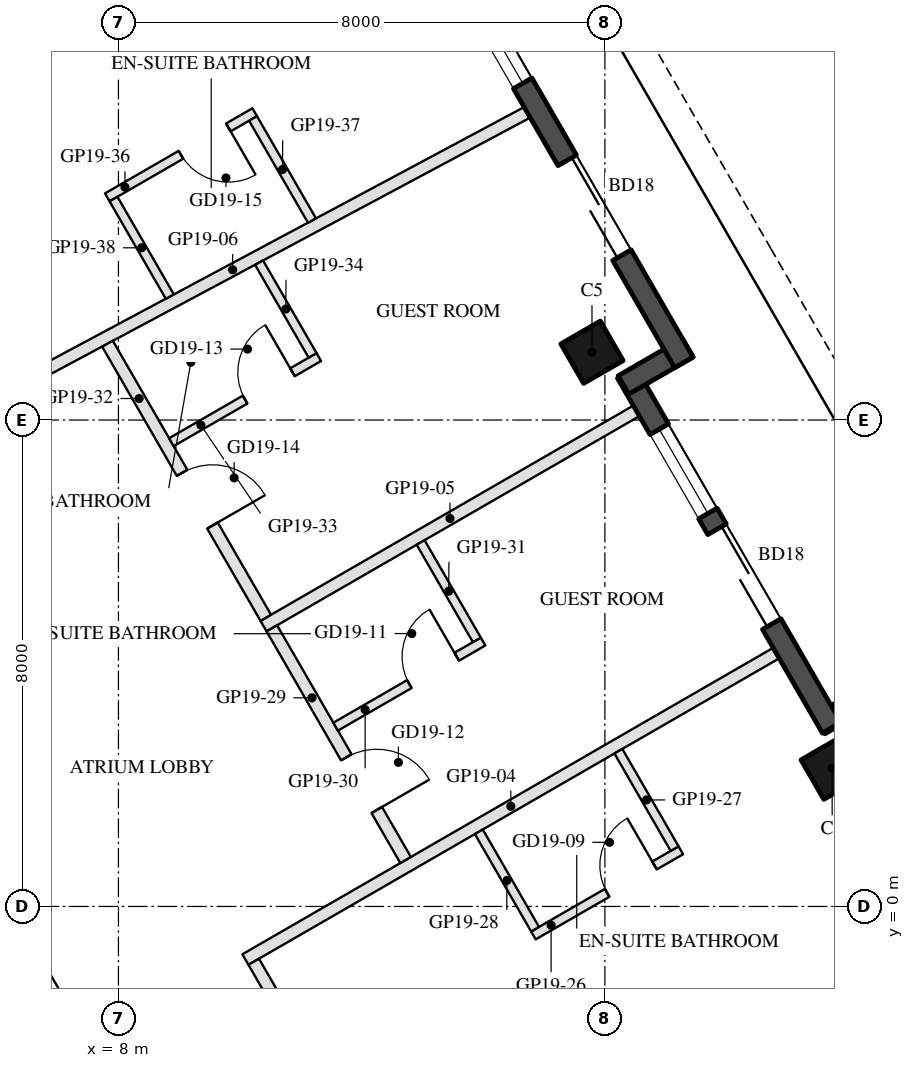
"""IFC4 building model, lengths in metres.
Left out: names, types, materials, properties, quantities, classifications, styles, units other than length and angle.
Written with IfcOpenShell. Run it as: python <this file> out.ifc"""

import sys

from ifc_helpers import new_model, si_unit, direction, frame, frame_2d, origin, origin_2d, place, context, subcontext, project, spatial, rectangle, hollow_rectangle, extrude, element, fill, save


model = new_model("IFC4")
c1 = context("Model", 3, precision=1e-05, world=origin(), true_north=direction((0.0, 1.0)))
c2 = subcontext(c1, "Body", "Model", "MODEL_VIEW")
j1 = project(units=[si_unit("LENGTHUNIT", "METRE"), si_unit("PLANEANGLEUNIT", "RADIAN")], contexts=[c1])
p1 = place(None, origin())
s1 = spatial("IfcSite", under=j1, at=p1, CompositionType="ELEMENT")
p2 = place(p1, origin())
s2 = spatial("IfcBuilding", under=s1, at=p2, CompositionType="ELEMENT")
p3 = place(p2, frame((0.0, 0.0, 205.8)))
s3 = spatial("IfcBuildingStorey", under=s2, at=p3, CompositionType="ELEMENT", Elevation=205.8)
for number, where, z_axis, x_axis in (
    (1, (19.738, 2.273, 0.0), (0.0, 0.0, 1.0), (-0.5, 0.866, 0.0)),
    (2, (15.788, 9.115, 0.0), (0.0, 0.0, 1.0), (-0.5, 0.866, 0.0)),
):
    element("IfcColumn", number, at=place(p3, frame(where, z_axis=z_axis, x_axis=x_axis)), inside=s3, PredefinedType="COLUMN", context=c2, shape_type="SweptSolid", body=[
        extrude(hollow_rectangle(XDim=0.75, YDim=0.75, WallThickness=0.035, at=origin_2d()), origin(), (0.0, 0.0, 1.0), 3.7),
    ])
p4 = place(p3, frame((20.588, 3.601, 0.0), z_axis=(0.0, 0.0, 1.0), x_axis=(-0.866005645448, -0.500034220881, 0.0)))
e3 = element("IfcWall", 3, at=p4, inside=s3, PredefinedType="SOLIDWALL", context=c2, shape_type="SweptSolid", body=[
    extrude(rectangle(XDim=1.22, YDim=0.35, at=frame_2d((0.61, 0.0))), origin(), (0.0, 0.0, 1.0), 3.55),
])
p5 = place(p3, frame((19.729, 2.938, 0.0), z_axis=(0.0, 0.0, 1.0), x_axis=(-0.499976430342, 0.866039011305, 0.0)))
e4 = element("IfcWall", 4, at=p5, inside=s3, PredefinedType="SOLIDWALL", context=c2, shape_type="SweptSolid", body=[
    extrude(rectangle(XDim=6.74, YDim=0.35, at=frame_2d((3.37, 0.0))), origin(), (0.0, 0.0, 1.0), 3.55),
])
p6 = place(p5, frame((1.97, 0.0, 0.0)))
e5 = element("IfcOpeningElement", 5, at=p6, cuts=e4, PredefinedType="OPENING", context=c2, shape_type="SweptSolid", body=[
    extrude(rectangle(XDim=1.8, YDim=2.4, at=frame_2d((0.9, 1.2))), frame((0.0, 0.185, 0.0), z_axis=(0.0, -1.0, 0.0), x_axis=(1.0, 0.0, 0.0)), (0.0, 0.0, 1.0), 0.37),
])
p7 = place(p5, frame((4.07, 0.0, 0.3)))
e6 = element("IfcOpeningElement", 6, at=p7, cuts=e4, PredefinedType="OPENING", context=c2, shape_type="SweptSolid", body=[
    extrude(rectangle(XDim=1.6, YDim=2.65, at=frame_2d((0.8, 1.325))), frame((0.0, 0.185, 0.0), z_axis=(0.0, -1.0, 0.0), x_axis=(1.0, 0.0, 0.0)), (0.0, 0.0, 1.0), 0.37),
])
p8 = place(p3, frame((16.306, 8.577, 0.0), z_axis=(0.0, 0.0, 1.0), x_axis=(0.866092288191, 0.499884134912, 0.0)))
e7 = element("IfcWall", 7, at=p8, inside=s3, PredefinedType="SOLIDWALL", context=c2, shape_type="SweptSolid", body=[
    extrude(rectangle(XDim=1.22, YDim=0.35, at=frame_2d((0.61, 0.0))), origin(), (0.0, 0.0, 1.0), 3.55),
])
p9 = place(p3, frame((17.299, 8.948, 0.0), z_axis=(0.0, 0.0, 1.0), x_axis=(-0.500010041276, 0.866019606374, 0.0)))
e8 = element("IfcWall", 8, at=p9, inside=s3, PredefinedType="SOLIDWALL", context=c2, shape_type="SweptSolid", body=[
    extrude(rectangle(XDim=9.7, YDim=0.35, at=frame_2d((4.85, 0.0))), origin(), (0.0, 0.0, 1.0), 3.55),
])
p10 = place(p9, frame((2.037, 0.0, 0.0)))
e9 = element("IfcOpeningElement", 9, at=p10, cuts=e8, PredefinedType="OPENING", context=c2, shape_type="SweptSolid", body=[
    extrude(rectangle(XDim=1.8, YDim=2.4, at=frame_2d((0.9, 1.2))), frame((0.0, 0.185, 0.0), z_axis=(0.0, -1.0, 0.0), x_axis=(1.0, 0.0, 0.0)), (0.0, 0.0, 1.0), 0.37),
])
p11 = place(p9, frame((5.3, 0.0, 0.3)))
e10 = element("IfcOpeningElement", 10, at=p11, cuts=e8, PredefinedType="OPENING", context=c2, shape_type="SweptSolid", body=[
    extrude(rectangle(XDim=2.7, YDim=2.65, at=frame_2d((1.35, 1.325))), frame((0.0, 0.185, 0.0), z_axis=(0.0, -1.0, 0.0), x_axis=(1.0, 0.0, 0.0)), (0.0, 0.0, 1.0), 0.37),
])
p12 = place(p3, frame((18.818, 4.167, 0.0), z_axis=(0.0, 0.0, 1.0), x_axis=(-0.866039179741, -0.499976138585, 0.0)))
e11 = element("IfcWall", 11, at=p12, inside=s3, PredefinedType="PARTITIONING", context=c2, shape_type="SweptSolid", body=[
    extrude(rectangle(XDim=10.08, YDim=0.2, at=frame_2d((5.04, 0.0))), origin(), (0.0, 0.0, 1.0), 3.06),
])
p13 = place(p3, frame((16.518, 8.151, 0.0), z_axis=(0.0, 0.0, 1.0), x_axis=(-0.866027673501, -0.499996068715, 0.0)))
e12 = element("IfcWall", 12, at=p13, inside=s3, PredefinedType="PARTITIONING", context=c2, shape_type="SweptSolid", body=[
    extrude(rectangle(XDim=7.08, YDim=0.2, at=frame_2d((3.54, 0.0))), origin(), (0.0, 0.0, 1.0), 3.06),
])
p14 = place(p3, frame((14.722, 13.061, 0.0), z_axis=(0.0, 0.0, 1.0), x_axis=(-0.881785716662, -0.471650241059, 0.0)))
e13 = element("IfcWall", 13, at=p14, inside=s3, PredefinedType="PARTITIONING", context=c2, shape_type="SweptSolid", body=[
    extrude(rectangle(XDim=10.986, YDim=0.2, at=frame_2d((5.493, 0.0))), origin(), (0.0, 0.0, 1.0), 2.95),
])
p15 = place(p3, frame((10.225, -0.909, 0.0), z_axis=(0.0, 0.0, 1.0), x_axis=(0.500011931275, -0.86601851515, 0.0)))
e14 = element("IfcWall", 14, at=p15, inside=s3, PredefinedType="PARTITIONING", context=c2, shape_type="SweptSolid", body=[
    extrude(rectangle(XDim=4.088, YDim=0.2, at=frame_2d((2.044, 0.0))), origin(), (0.0, 0.0, 1.0), 2.95),
])
p16 = place(p15, frame((1.544, 0.0, 0.0)))
e15 = element("IfcOpeningElement", 15, at=p16, cuts=e14, PredefinedType="OPENING", context=c2, shape_type="SweptSolid", body=[
    extrude(rectangle(XDim=1.0, YDim=2.1, at=frame_2d((0.5, 1.05))), frame((0.0, 0.11, 0.0), z_axis=(0.0, -1.0, 0.0), x_axis=(1.0, 0.0, 0.0)), (0.0, 0.0, 1.0), 0.22),
])
p17 = place(p3, frame((14.824, -0.477, 0.0), z_axis=(0.0, 0.0, 1.0), x_axis=(0.866034573852, 0.49998411664, 0.0)))
e16 = element("IfcWall", 16, at=p17, inside=s3, PredefinedType="PARTITIONING", context=c2, shape_type="SweptSolid", body=[
    extrude(rectangle(XDim=2.8, YDim=0.15, at=frame_2d((1.4, 0.0))), origin(), (0.0, 0.0, 1.0), 2.95),
])
p18 = place(p17, frame((1.4, 0.0, 0.0)))
e17 = element("IfcOpeningElement", 17, at=p18, cuts=e16, PredefinedType="OPENING", context=c2, shape_type="SweptSolid", body=[
    extrude(rectangle(XDim=0.9, YDim=2.1, at=frame_2d((0.45, 1.05))), frame((0.0, 0.085, 0.0), z_axis=(0.0, -1.0, 0.0), x_axis=(1.0, 0.0, 0.0)), (0.0, 0.0, 1.0), 0.17),
])
for number, where, z_axis, x_axis in (
    (18, (17.147, 0.951, 0.0), (0.0, 0.0, 1.0), (-0.5, 0.866, 0.0)),
    (19, (14.852, -0.374, 0.0), (0.0, 0.0, 1.0), (-0.5, 0.866, 0.0)),
):
    element("IfcWall", number, at=place(p3, frame(where, z_axis=z_axis, x_axis=x_axis)), inside=s3, PredefinedType="PARTITIONING", context=c2, shape_type="SweptSolid", body=[
        extrude(rectangle(XDim=1.85, YDim=0.15, at=frame_2d((0.925, 0.0))), origin(), (0.0, 0.0, 1.0), 3.55),
    ])
p19 = place(p3, frame((10.523, 4.574, 0.0), z_axis=(0.0, 0.0, 1.0), x_axis=(0.499988222896, -0.866032203192, 0.0)))
e20 = element("IfcWall", 20, at=p19, inside=s3, PredefinedType="PARTITIONING", context=c2, shape_type="SweptSolid", body=[
    extrude(rectangle(XDim=4.4, YDim=0.2, at=frame_2d((2.2, 0.0))), origin(), (0.0, 0.0, 1.0), 2.95),
])
p20 = place(p19, frame((2.45, 0.0, 0.0)))
e21 = element("IfcOpeningElement", 21, at=p20, cuts=e20, PredefinedType="OPENING", context=c2, shape_type="SweptSolid", body=[
    extrude(rectangle(XDim=1.0, YDim=2.1, at=frame_2d((0.5, 1.05))), frame((0.0, 0.11, 0.0), z_axis=(0.0, -1.0, 0.0), x_axis=(1.0, 0.0, 0.0)), (0.0, 0.0, 1.0), 0.22),
])
p21 = place(p3, frame((11.572, 2.957, 0.0), z_axis=(0.0, 0.0, 1.0), x_axis=(0.865996816683, 0.500049511043, 0.0)))
e22 = element("IfcWall", 22, at=p21, inside=s3, PredefinedType="PARTITIONING", context=c2, shape_type="SweptSolid", body=[
    extrude(rectangle(XDim=2.8, YDim=0.15, at=frame_2d((1.4, 0.0))), origin(), (0.0, 0.0, 1.0), 3.55),
])
p22 = place(p21, frame((1.4, 0.0, 0.0)))
e23 = element("IfcOpeningElement", 23, at=p22, cuts=e22, PredefinedType="OPENING", context=c2, shape_type="SweptSolid", body=[
    extrude(rectangle(XDim=0.9, YDim=2.1, at=frame_2d((0.45, 1.05))), frame((0.0, 0.085, 0.0), z_axis=(0.0, -1.0, 0.0), x_axis=(1.0, 0.0, 0.0)), (0.0, 0.0, 1.0), 0.17),
])
p23 = place(p3, frame((13.894, 4.385, 0.0), z_axis=(0.0, 0.0, 1.0), x_axis=(-0.499985172903, 0.866033964044, 0.0)))
e24 = element("IfcWall", 24, at=p23, inside=s3, PredefinedType="PARTITIONING", context=c2, shape_type="SweptSolid", body=[
    extrude(rectangle(XDim=1.85, YDim=0.15, at=frame_2d((0.925, 0.0))), origin(), (0.0, 0.0, 1.0), 3.55),
])
p24 = place(p3, frame((7.82, 9.256, 0.0), z_axis=(0.0, 0.0, 1.0), x_axis=(0.499987686533, -0.866032512851, 0.0)))
e25 = element("IfcWall", 25, at=p24, inside=s3, PredefinedType="PARTITIONING", context=c2, shape_type="SweptSolid", body=[
    extrude(rectangle(XDim=5.206, YDim=0.2, at=frame_2d((2.603, 0.0))), origin(), (0.0, 0.0, 1.0), 2.95),
])
p25 = place(p24, frame((2.453, 0.0, 0.0)))
e26 = element("IfcOpeningElement", 26, at=p25, cuts=e25, PredefinedType="OPENING", context=c2, shape_type="SweptSolid", body=[
    extrude(rectangle(XDim=1.0, YDim=2.1, at=frame_2d((0.5, 1.05))), frame((0.0, 0.11, 0.0), z_axis=(0.0, -1.0, 0.0), x_axis=(1.0, 0.0, 0.0)), (0.0, 0.0, 1.0), 0.22),
])
p26 = place(p3, frame((8.871, 7.636, 0.0), z_axis=(0.0, 0.0, 1.0), x_axis=(0.865996816683, 0.500049511043, 0.0)))
e27 = element("IfcWall", 27, at=p26, inside=s3, PredefinedType="PARTITIONING", context=c2, shape_type="SweptSolid", body=[
    extrude(rectangle(XDim=2.8, YDim=0.15, at=frame_2d((1.4, 0.0))), origin(), (0.0, 0.0, 1.0), 3.55),
])
p27 = place(p26, frame((1.4, 0.0, 0.0)))
e28 = element("IfcOpeningElement", 28, at=p27, cuts=e27, PredefinedType="OPENING", context=c2, shape_type="SweptSolid", body=[
    extrude(rectangle(XDim=0.9, YDim=2.1, at=frame_2d((0.45, 1.05))), frame((0.0, 0.085, 0.0), z_axis=(0.0, -1.0, 0.0), x_axis=(1.0, 0.0, 0.0)), (0.0, 0.0, 1.0), 0.17),
])
p28 = place(p3, frame((11.193, 9.063, 0.0), z_axis=(0.0, 0.0, 1.0), x_axis=(-0.499910413417, 0.866077120444, 0.0)))
e29 = element("IfcWall", 29, at=p28, inside=s3, PredefinedType="PARTITIONING", context=c2, shape_type="SweptSolid", body=[
    extrude(rectangle(XDim=1.761, YDim=0.15, at=frame_2d((0.881, 0.0))), origin(), (0.0, 0.0, 1.0), 2.95),
])
p29 = place(p3, frame((10.241, 13.062, 0.0), z_axis=(0.0, 0.0, 1.0), x_axis=(-0.865996816683, -0.500049511043, 0.0)))
e30 = element("IfcWall", 30, at=p29, inside=s3, PredefinedType="PARTITIONING", context=c2, shape_type="SweptSolid", body=[
    extrude(rectangle(XDim=2.8, YDim=0.15, at=frame_2d((1.4, 0.0))), origin(), (0.0, 0.0, 1.0), 3.55),
])
p30 = place(p29, frame((0.5, 0.0, 0.0)))
e31 = element("IfcOpeningElement", 31, at=p30, cuts=e30, PredefinedType="OPENING", context=c2, shape_type="SweptSolid", body=[
    extrude(rectangle(XDim=0.9, YDim=2.1, at=frame_2d((0.45, 1.05))), frame((0.0, 0.085, 0.0), z_axis=(0.0, -1.0, 0.0), x_axis=(1.0, 0.0, 0.0)), (0.0, 0.0, 1.0), 0.17),
])
p31 = place(p3, frame((11.183, 11.281, 0.0), z_axis=(0.0, 0.0, 1.0), x_axis=(-0.500013181875, 0.866017793092, 0.0)))
e32 = element("IfcWall", 32, at=p31, inside=s3, PredefinedType="PARTITIONING", context=c2, shape_type="SweptSolid", body=[
    extrude(rectangle(XDim=1.938, YDim=0.15, at=frame_2d((0.969, 0.0))), origin(), (0.0, 0.0, 1.0), 3.55),
])
p32 = place(p3, frame((8.844, 10.031, 0.0), z_axis=(0.0, 0.0, 1.0), x_axis=(-0.499924019097, 0.866069266935, 0.0)))
e33 = element("IfcWall", 33, at=p32, inside=s3, PredefinedType="PARTITIONING", context=c2, shape_type="SweptSolid", body=[
    extrude(rectangle(XDim=1.852, YDim=0.15, at=frame_2d((0.926, 0.0))), origin(), (0.0, 0.0, 1.0), 3.55),
])
p33 = place(p6, frame((1.8, 0.0, 0.0), z_axis=(0.0, 0.0, 1.0), x_axis=(-1.0, 0.0, 0.0)))
e34 = element("IfcDoor", 34, at=p33, inside=s3, OperationType="SLIDING_TO_LEFT", PredefinedType="DOOR", context=c2, shape_type="SweptSolid", body=[
    extrude(rectangle(XDim=1.8, YDim=2.4, at=frame_2d((0.9, 1.2))), frame((0.0, 0.025, 0.0), z_axis=(0.0, -1.0, 0.0), x_axis=(1.0, 0.0, 0.0)), (0.0, 0.0, 1.0), 0.05),
])
fill(e5, e34)
p34 = place(p7, origin())
e35 = element("IfcWindow", 35, at=p34, inside=s3, PartitioningType="SINGLE_PANEL", PredefinedType="WINDOW", context=c2, shape_type="SweptSolid", body=[
    extrude(rectangle(XDim=1.6, YDim=2.65, at=frame_2d((0.8, 1.325))), frame((0.0, 0.03, 0.0), z_axis=(0.0, -1.0, 0.0), x_axis=(1.0, 0.0, 0.0)), (0.0, 0.0, 1.0), 0.06),
])
fill(e6, e35)
p35 = place(p10, frame((1.8, 0.0, 0.0), z_axis=(0.0, 0.0, 1.0), x_axis=(-1.0, 0.0, 0.0)))
e36 = element("IfcDoor", 36, at=p35, inside=s3, OperationType="SLIDING_TO_LEFT", PredefinedType="DOOR", context=c2, shape_type="SweptSolid", body=[
    extrude(rectangle(XDim=1.8, YDim=2.4, at=frame_2d((0.9, 1.2))), frame((0.0, 0.025, 0.0), z_axis=(0.0, -1.0, 0.0), x_axis=(1.0, 0.0, 0.0)), (0.0, 0.0, 1.0), 0.05),
])
fill(e9, e36)
p36 = place(p11, origin())
e37 = element("IfcWindow", 37, at=p36, inside=s3, PartitioningType="SINGLE_PANEL", PredefinedType="WINDOW", context=c2, shape_type="SweptSolid", body=[
    extrude(rectangle(XDim=2.7, YDim=2.65, at=frame_2d((1.35, 1.325))), frame((0.0, 0.03, 0.0), z_axis=(0.0, -1.0, 0.0), x_axis=(1.0, 0.0, 0.0)), (0.0, 0.0, 1.0), 0.06),
])
fill(e10, e37)
p37 = place(p18, origin())
e38 = element("IfcDoor", 38, at=p37, inside=s3, OperationType="SINGLE_SWING_RIGHT", PredefinedType="DOOR", context=c2, shape_type="SweptSolid", body=[
    extrude(rectangle(XDim=0.9, YDim=2.1, at=frame_2d((0.45, 1.05))), frame((0.0, 0.025, 0.0), z_axis=(0.0, -1.0, 0.0), x_axis=(1.0, 0.0, 0.0)), (0.0, 0.0, 1.0), 0.05),
])
fill(e17, e38)
p38 = place(p22, origin())
e39 = element("IfcDoor", 39, at=p38, inside=s3, OperationType="SINGLE_SWING_RIGHT", PredefinedType="DOOR", context=c2, shape_type="SweptSolid", body=[
    extrude(rectangle(XDim=0.9, YDim=2.1, at=frame_2d((0.45, 1.05))), frame((0.0, 0.025, 0.0), z_axis=(0.0, -1.0, 0.0), x_axis=(1.0, 0.0, 0.0)), (0.0, 0.0, 1.0), 0.05),
])
fill(e23, e39)
p39 = place(p20, origin())
e40 = element("IfcDoor", 40, at=p39, inside=s3, OperationType="SINGLE_SWING_RIGHT", PredefinedType="DOOR", context=c2, shape_type="SweptSolid", body=[
    extrude(rectangle(XDim=1.0, YDim=2.1, at=frame_2d((0.5, 1.05))), frame((0.0, 0.025, 0.0), z_axis=(0.0, -1.0, 0.0), x_axis=(1.0, 0.0, 0.0)), (0.0, 0.0, 1.0), 0.05),
])
fill(e21, e40)
p40 = place(p27, origin())
e41 = element("IfcDoor", 41, at=p40, inside=s3, OperationType="SINGLE_SWING_RIGHT", PredefinedType="DOOR", context=c2, shape_type="SweptSolid", body=[
    extrude(rectangle(XDim=0.9, YDim=2.1, at=frame_2d((0.45, 1.05))), frame((0.0, 0.025, 0.0), z_axis=(0.0, -1.0, 0.0), x_axis=(1.0, 0.0, 0.0)), (0.0, 0.0, 1.0), 0.05),
])
fill(e28, e41)
p41 = place(p25, origin())
e42 = element("IfcDoor", 42, at=p41, inside=s3, OperationType="SINGLE_SWING_RIGHT", PredefinedType="DOOR", context=c2, shape_type="SweptSolid", body=[
    extrude(rectangle(XDim=1.0, YDim=2.1, at=frame_2d((0.5, 1.05))), frame((0.0, 0.025, 0.0), z_axis=(0.0, -1.0, 0.0), x_axis=(1.0, 0.0, 0.0)), (0.0, 0.0, 1.0), 0.05),
])
fill(e26, e42)
p42 = place(p30, origin())
e43 = element("IfcDoor", 43, at=p42, inside=s3, OperationType="SINGLE_SWING_LEFT", PredefinedType="DOOR", context=c2, shape_type="SweptSolid", body=[
    extrude(rectangle(XDim=0.9, YDim=2.1, at=frame_2d((0.45, 1.05))), frame((0.0, 0.025, 0.0), z_axis=(0.0, -1.0, 0.0), x_axis=(1.0, 0.0, 0.0)), (0.0, 0.0, 1.0), 0.05),
])
fill(e31, e43)
save(model, sys.argv[1])
